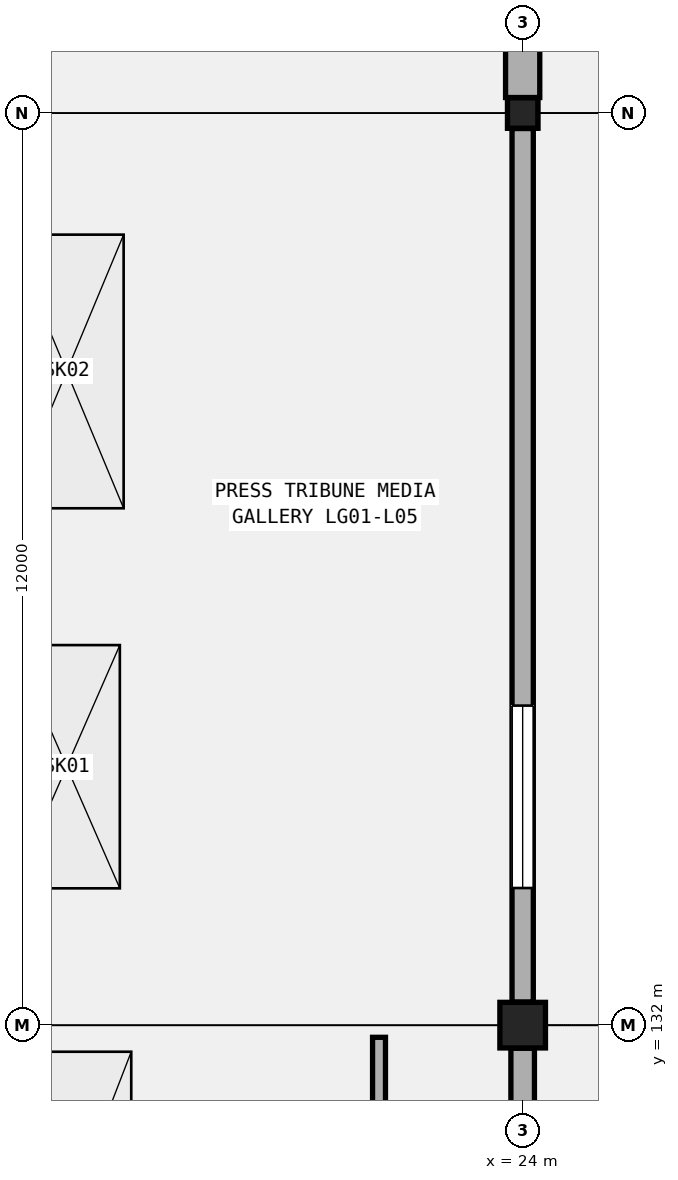
"""IFC4 building model, lengths in metres.
Left out: names, types, materials, properties, quantities, classifications, styles, units other than length and angle.
Written with IfcOpenShell. Run it as: python <this file> out.ifc"""

import sys

from ifc_helpers import new_model, si_unit, direction, frame, frame_2d, origin, origin_2d, place, context, subcontext, project, spatial, rectangle, hollow_rectangle, extrude, element, fill, save


model = new_model("IFC4")
c1 = context("Model", 3, precision=1e-05, world=origin(), true_north=direction((0.0, 1.0)))
c2 = subcontext(c1, "Body", "Model", "MODEL_VIEW")
j1 = project(units=[si_unit("LENGTHUNIT", "METRE"), si_unit("PLANEANGLEUNIT", "RADIAN")], contexts=[c1])
p1 = place(None, origin())
s1 = spatial("IfcSite", under=j1, at=p1, CompositionType="ELEMENT")
p2 = place(p1, origin())
s2 = spatial("IfcBuilding", under=s1, at=p2, CompositionType="ELEMENT")
p3 = place(p2, frame((0.0, 0.0, 25.8)))
s3 = spatial("IfcBuildingStorey", under=s2, at=p3, CompositionType="ELEMENT", Elevation=25.8)
p4 = place(p3, frame((24.0, 132.0, 0.0), z_axis=(0.0, 0.0, 1.0), x_axis=(1.0, 0.0, 0.0)))
e1 = element("IfcColumn", 1, at=p4, inside=s3, PredefinedType="COLUMN", context=c2, shape_type="SweptSolid", body=[
    extrude(rectangle(XDim=0.6, YDim=0.6, at=origin_2d()), origin(), (0.0, 0.0, 1.0), 5.4),
])
p5 = place(p3, frame((24.0, 144.0, 0.0), z_axis=(0.0, 0.0, 1.0), x_axis=(1.0, 0.0, 0.0)))
e2 = element("IfcColumn", 2, at=p5, inside=s3, PredefinedType="COLUMN", context=c2, shape_type="SweptSolid", body=[
    extrude(hollow_rectangle(XDim=0.4, YDim=0.4, WallThickness=0.016, InnerFilletRadius=0.016, OuterFilletRadius=0.032, at=origin_2d()), origin(), (0.0, 0.0, 1.0), 5.4),
])
p6 = place(p3, frame((24.0, 120.354, 0.0), z_axis=(0.0, 0.0, 1.0), x_axis=(0.0, 1.0, 0.0)))
e3 = element("IfcWall", 3, at=p6, inside=s3, PredefinedType="SOLIDWALL", context=c2, shape_type="SweptSolid", body=[
    extrude(rectangle(XDim=11.342, YDim=0.31, at=frame_2d((5.671, 0.0))), origin(), (0.0, 0.0, 1.0), 4.13),
])
p7 = place(p6, frame((1.5, 0.0, 0.95)))
e4 = element("IfcOpeningElement", 4, at=p7, cuts=e3, PredefinedType="OPENING", context=c2, shape_type="SweptSolid", body=[
    extrude(rectangle(XDim=2.25, YDim=2.2, at=frame_2d((1.125, 1.1))), frame((0.0, 0.165, 0.0), z_axis=(0.0, -1.0, 0.0), x_axis=(1.0, 0.0, 0.0)), (0.0, 0.0, 1.0), 0.33),
])
p8 = place(p3, frame((24.0, 132.304, 0.0), z_axis=(0.0, 0.0, 1.0), x_axis=(0.0, 1.0, 0.0)))
e5 = element("IfcWall", 5, at=p8, inside=s3, PredefinedType="SOLIDWALL", context=c2, shape_type="SweptSolid", body=[
    extrude(rectangle(XDim=11.492, YDim=0.28, at=frame_2d((5.746, 0.0))), origin(), (0.0, 0.0, 1.0), 4.13),
])
p9 = place(p8, frame((1.5, 0.0, 0.95)))
e6 = element("IfcOpeningElement", 6, at=p9, cuts=e5, PredefinedType="OPENING", context=c2, shape_type="SweptSolid", body=[
    extrude(rectangle(XDim=2.4, YDim=1.65, at=frame_2d((1.2, 0.825))), frame((0.0, 0.15, 0.0), z_axis=(0.0, -1.0, 0.0), x_axis=(1.0, 0.0, 0.0)), (0.0, 0.0, 1.0), 0.3),
])
p10 = place(p3, frame((24.0, 144.204, 0.0), z_axis=(0.0, 0.0, 1.0), x_axis=(0.0, 1.0, 0.0)))
e7 = element("IfcWall", 7, at=p10, inside=s3, PredefinedType="SOLIDWALL", context=c2, shape_type="SweptSolid", body=[
    extrude(rectangle(XDim=11.617, YDim=0.45, at=frame_2d((5.809, 0.0))), origin(), (0.0, 0.0, 1.0), 4.452),
])
p11 = place(p10, frame((1.5, 0.0, 0.95)))
e8 = element("IfcOpeningElement", 8, at=p11, cuts=e7, PredefinedType="OPENING", context=c2, shape_type="SweptSolid", body=[
    extrude(rectangle(XDim=2.4, YDim=2.05, at=frame_2d((1.2, 1.025))), frame((0.0, 0.235, 0.0), z_axis=(0.0, -1.0, 0.0), x_axis=(1.0, 0.0, 0.0)), (0.0, 0.0, 1.0), 0.47),
])
p12 = place(p3, frame((22.11, 120.16, 0.0), z_axis=(0.0, 0.0, 1.0), x_axis=(0.0, 1.0, 0.0)))
e9 = element("IfcWall", 9, at=p12, inside=s3, PredefinedType="PARTITIONING", context=c2, shape_type="SweptSolid", body=[
    extrude(rectangle(XDim=11.68, YDim=0.17, at=frame_2d((5.84, 0.0))), origin(), (0.0, 0.0, 1.0), 4.35),
])
p13 = place(p12, frame((2.086, 0.0, 0.0)))
e10 = element("IfcOpeningElement", 10, at=p13, cuts=e9, PredefinedType="OPENING", context=c2, shape_type="SweptSolid", body=[
    extrude(rectangle(XDim=1.12, YDim=2.18, at=frame_2d((0.56, 1.09))), frame((0.0, 0.095, 0.0), z_axis=(0.0, -1.0, 0.0), x_axis=(1.0, 0.0, 0.0)), (0.0, 0.0, 1.0), 0.19),
])
p14 = place(p12, frame((7.991, 0.0, 0.0)))
e11 = element("IfcOpeningElement", 11, at=p14, cuts=e9, PredefinedType="OPENING", context=c2, shape_type="SweptSolid", body=[
    extrude(rectangle(XDim=1.15, YDim=2.15, at=frame_2d((0.575, 1.075))), frame((0.0, 0.095, 0.0), z_axis=(0.0, -1.0, 0.0), x_axis=(1.0, 0.0, 0.0)), (0.0, 0.0, 1.0), 0.19),
])
p15 = place(p9, origin())
e12 = element("IfcWindow", 12, at=p15, inside=s3, PartitioningType="SINGLE_PANEL", PredefinedType="WINDOW", context=c2, shape_type="SweptSolid", body=[
    extrude(rectangle(XDim=2.4, YDim=1.65, at=frame_2d((1.2, 0.825))), frame((0.0, 0.03, 0.0), z_axis=(0.0, -1.0, 0.0), x_axis=(1.0, 0.0, 0.0)), (0.0, 0.0, 1.0), 0.06),
])
fill(e6, e12)
p16 = place(p2, frame((0.0, 0.0, 31.2)))
p17 = place(p16, frame((0.0, 0.0, -0.36)))
p18 = place(p17, frame((18.0, 135.4, 0.0)))
p19 = place(p18, frame((0.0, 0.0, 0.31)))
e13 = element("IfcWindow", 13, at=p19, inside=s3, PartitioningType="SINGLE_PANEL", PredefinedType="SKYLIGHT", context=c2, shape_type="SweptSolid", body=[
    extrude(rectangle(XDim=3.2, YDim=1.4, at=origin_2d()), origin(), (0.0, 0.0, 1.0), 0.05),
])
p20 = place(p17, frame((18.0, 140.6, 0.0)))
p21 = place(p20, frame((0.0, 0.0, 0.31)))
e14 = element("IfcWindow", 14, at=p21, inside=s3, PartitioningType="SINGLE_PANEL", PredefinedType="SKYLIGHT", context=c2, shape_type="SweptSolid", body=[
    extrude(rectangle(XDim=3.6, YDim=1.5, at=origin_2d()), origin(), (0.0, 0.0, 1.0), 0.05),
])
save(model, sys.argv[1])
